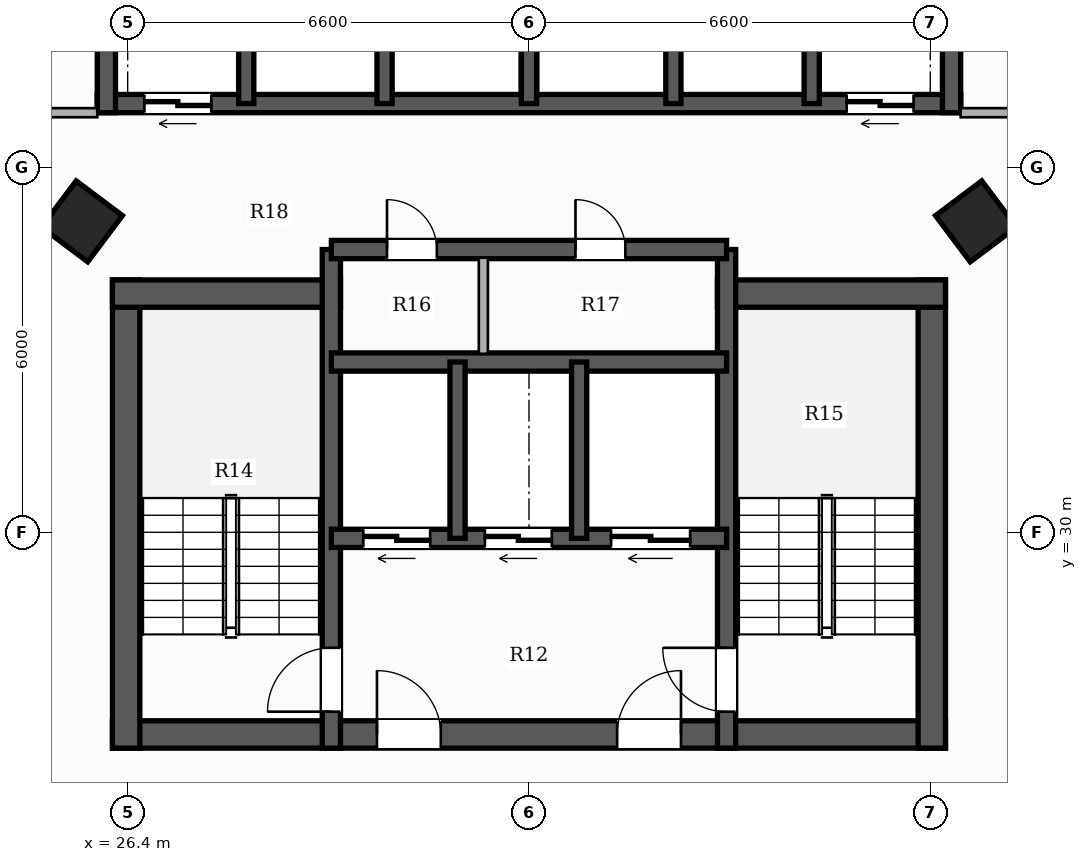
"""IFC4 building model, lengths in metres.
Left out: names, types, materials, properties, quantities, classifications, styles, units other than length and angle.
Written with IfcOpenShell. Run it as: python <this file> out.ifc"""

import sys

from ifc_helpers import new_model, si_unit, direction, frame, frame_2d, origin, origin_2d, place, context, subcontext, project, spatial, rectangle, hollow_rectangle, extrude, element, fill, save


model = new_model("IFC4")
c1 = context("Model", 3, precision=1e-05, world=origin(), true_north=direction((0.0, 1.0)))
c2 = subcontext(c1, "Body", "Model", "MODEL_VIEW")
j1 = project(units=[si_unit("LENGTHUNIT", "METRE"), si_unit("PLANEANGLEUNIT", "RADIAN")], contexts=[c1])
p1 = place(None, origin())
s1 = spatial("IfcSite", under=j1, at=p1, CompositionType="ELEMENT")
p2 = place(p1, origin())
s2 = spatial("IfcBuilding", under=s1, at=p2, CompositionType="ELEMENT")
p3 = place(p2, frame((0.0, 0.0, 87.35)))
s3 = spatial("IfcBuildingStorey", under=s2, at=p3, CompositionType="ELEMENT", Elevation=87.35)
p4 = place(p3, frame((26.15, 26.675, 0.0), z_axis=(0.0, 0.0, 1.0), x_axis=(1.0, 0.0, 0.0)))
e1 = element("IfcWall", 1, at=p4, inside=s3, PredefinedType="SHEAR", context=c2, shape_type="SweptSolid", body=[
    extrude(rectangle(XDim=13.7, YDim=0.45, at=frame_2d((6.85, 0.0))), origin(), (0.0, 0.0, 1.0), 3.3),
])
p5 = place(p4, frame((4.35, 0.0, 0.0)))
e2 = element("IfcOpeningElement", 2, at=p5, cuts=e1, PredefinedType="OPENING", context=c2, shape_type="SweptSolid", body=[
    extrude(rectangle(XDim=1.05, YDim=2.15, at=frame_2d((0.525, 1.075))), frame((0.0, 0.235, 0.0), z_axis=(0.0, -1.0, 0.0), x_axis=(1.0, 0.0, 0.0)), (0.0, 0.0, 1.0), 0.47),
])
p6 = place(p4, frame((8.3, 0.0, 0.0)))
e3 = element("IfcOpeningElement", 3, at=p6, cuts=e1, PredefinedType="OPENING", context=c2, shape_type="SweptSolid", body=[
    extrude(rectangle(XDim=1.05, YDim=2.15, at=frame_2d((0.525, 1.075))), frame((0.0, 0.235, 0.0), z_axis=(0.0, -1.0, 0.0), x_axis=(1.0, 0.0, 0.0)), (0.0, 0.0, 1.0), 0.47),
])
p7 = place(p3, frame((26.375, 26.45, 0.0), z_axis=(0.0, 0.0, 1.0), x_axis=(0.0, 1.0, 0.0)))
e4 = element("IfcWall", 4, at=p7, inside=s3, PredefinedType="SHEAR", context=c2, shape_type="SweptSolid", body=[
    extrude(rectangle(XDim=7.7, YDim=0.45, at=frame_2d((3.85, 0.0))), origin(), (0.0, 0.0, 1.0), 3.3),
])
p8 = place(p3, frame((26.15, 33.925, 0.0), z_axis=(0.0, 0.0, 1.0), x_axis=(1.0, 0.0, 0.0)))
e5 = element("IfcWall", 5, at=p8, inside=s3, PredefinedType="SHEAR", context=c2, shape_type="SweptSolid", body=[
    extrude(rectangle(XDim=3.75, YDim=0.45, at=frame_2d((1.875, 0.0))), origin(), (0.0, 0.0, 1.0), 3.3),
])
p9 = place(p3, frame((39.625, 26.45, 0.0), z_axis=(0.0, 0.0, 1.0), x_axis=(0.0, 1.0, 0.0)))
e6 = element("IfcWall", 6, at=p9, inside=s3, PredefinedType="SHEAR", context=c2, shape_type="SweptSolid", body=[
    extrude(rectangle(XDim=7.7, YDim=0.45, at=frame_2d((3.85, 0.0))), origin(), (0.0, 0.0, 1.0), 3.3),
])
p10 = place(p3, frame((36.1, 33.925, 0.0), z_axis=(0.0, 0.0, 1.0), x_axis=(1.0, 0.0, 0.0)))
e7 = element("IfcWall", 7, at=p10, inside=s3, PredefinedType="SHEAR", context=c2, shape_type="SweptSolid", body=[
    extrude(rectangle(XDim=3.75, YDim=0.45, at=frame_2d((1.875, 0.0))), origin(), (0.0, 0.0, 1.0), 3.3),
])
p11 = place(p3, frame((29.75, 26.45, 0.0), z_axis=(0.0, 0.0, 1.0), x_axis=(0.0, 1.0, 0.0)))
e8 = element("IfcWall", 8, at=p11, inside=s3, PredefinedType="SHEAR", context=c2, shape_type="SweptSolid", body=[
    extrude(rectangle(XDim=8.2, YDim=0.3, at=frame_2d((4.1, 0.0))), origin(), (0.0, 0.0, 1.0), 3.3),
])
p12 = place(p11, frame((0.6, 0.0, 0.0)))
e9 = element("IfcOpeningElement", 9, at=p12, cuts=e8, PredefinedType="OPENING", context=c2, shape_type="SweptSolid", body=[
    extrude(rectangle(XDim=1.05, YDim=2.15, at=frame_2d((0.525, 1.075))), frame((0.0, 0.16, 0.0), z_axis=(0.0, -1.0, 0.0), x_axis=(1.0, 0.0, 0.0)), (0.0, 0.0, 1.0), 0.32),
])
p13 = place(p3, frame((36.25, 26.45, 0.0), z_axis=(0.0, 0.0, 1.0), x_axis=(0.0, 1.0, 0.0)))
e10 = element("IfcWall", 10, at=p13, inside=s3, PredefinedType="SHEAR", context=c2, shape_type="SweptSolid", body=[
    extrude(rectangle(XDim=8.2, YDim=0.3, at=frame_2d((4.1, 0.0))), origin(), (0.0, 0.0, 1.0), 3.3),
])
p14 = place(p13, frame((0.6, 0.0, 0.0)))
e11 = element("IfcOpeningElement", 11, at=p14, cuts=e10, PredefinedType="OPENING", context=c2, shape_type="SweptSolid", body=[
    extrude(rectangle(XDim=1.05, YDim=2.15, at=frame_2d((0.525, 1.075))), frame((0.0, 0.16, 0.0), z_axis=(0.0, -1.0, 0.0), x_axis=(1.0, 0.0, 0.0)), (0.0, 0.0, 1.0), 0.32),
])
p15 = place(p3, frame((36.25, 29.9, 0.0), z_axis=(0.0, 0.0, 1.0), x_axis=(-1.0, 0.0, 0.0)))
e12 = element("IfcWall", 12, at=p15, inside=s3, PredefinedType="SHEAR", context=c2, shape_type="SweptSolid", body=[
    extrude(rectangle(XDim=6.5, YDim=0.3, at=frame_2d((3.25, 0.0))), origin(), (0.0, 0.0, 1.0), 3.3),
])
p16 = place(p15, frame((4.875, 0.0, 0.0)))
e13 = element("IfcOpeningElement", 13, at=p16, cuts=e12, PredefinedType="OPENING", context=c2, shape_type="SweptSolid", body=[
    extrude(rectangle(XDim=1.1, YDim=2.2, at=frame_2d((0.55, 1.1))), frame((0.0, 0.16, 0.0), z_axis=(0.0, -1.0, 0.0), x_axis=(1.0, 0.0, 0.0)), (0.0, 0.0, 1.0), 0.32),
])
p17 = place(p15, frame((2.875, 0.0, 0.0)))
e14 = element("IfcOpeningElement", 14, at=p17, cuts=e12, PredefinedType="OPENING", context=c2, shape_type="SweptSolid", body=[
    extrude(rectangle(XDim=1.1, YDim=2.2, at=frame_2d((0.55, 1.1))), frame((0.0, 0.16, 0.0), z_axis=(0.0, -1.0, 0.0), x_axis=(1.0, 0.0, 0.0)), (0.0, 0.0, 1.0), 0.32),
])
p18 = place(p15, frame((0.6, 0.0, 0.0)))
e15 = element("IfcOpeningElement", 15, at=p18, cuts=e12, PredefinedType="OPENING", context=c2, shape_type="SweptSolid", body=[
    extrude(rectangle(XDim=1.3, YDim=2.2, at=frame_2d((0.65, 1.1))), frame((0.0, 0.16, 0.0), z_axis=(0.0, -1.0, 0.0), x_axis=(1.0, 0.0, 0.0)), (0.0, 0.0, 1.0), 0.32),
])
p19 = place(p3, frame((29.75, 32.8, 0.0), z_axis=(0.0, 0.0, 1.0), x_axis=(1.0, 0.0, 0.0)))
e16 = element("IfcWall", 16, at=p19, inside=s3, PredefinedType="SHEAR", context=c2, shape_type="SweptSolid", body=[
    extrude(rectangle(XDim=6.5, YDim=0.3, at=frame_2d((3.25, 0.0))), origin(), (0.0, 0.0, 1.0), 3.3),
])
for number, where, z_axis, x_axis in (
    (17, (31.825, 29.9, 0.0), (0.0, 0.0, 1.0), (0.0, 1.0, 0.0)),
    (18, (33.825, 29.9, 0.0), (0.0, 0.0, 1.0), (0.0, 1.0, 0.0)),
):
    element("IfcWall", number, at=place(p3, frame(where, z_axis=z_axis, x_axis=x_axis)), inside=s3, PredefinedType="SHEAR", context=c2, shape_type="SweptSolid", body=[
        extrude(rectangle(XDim=2.9, YDim=0.25, at=frame_2d((1.45, 0.0))), origin(), (0.0, 0.0, 1.0), 3.3),
    ])
p20 = place(p3, frame((29.75, 34.65, 0.0), z_axis=(0.0, 0.0, 1.0), x_axis=(1.0, 0.0, 0.0)))
e19 = element("IfcWall", 19, at=p20, inside=s3, PredefinedType="SHEAR", context=c2, shape_type="SweptSolid", body=[
    extrude(rectangle(XDim=6.5, YDim=0.3, at=frame_2d((3.25, 0.0))), origin(), (0.0, 0.0, 1.0), 3.3),
])
p21 = place(p20, frame((0.915, 0.0, 0.0)))
e20 = element("IfcOpeningElement", 20, at=p21, cuts=e19, PredefinedType="OPENING", context=c2, shape_type="SweptSolid", body=[
    extrude(rectangle(XDim=0.82, YDim=2.1, at=frame_2d((0.41, 1.05))), frame((0.0, 0.16, 0.0), z_axis=(0.0, -1.0, 0.0), x_axis=(1.0, 0.0, 0.0)), (0.0, 0.0, 1.0), 0.32),
])
p22 = place(p20, frame((4.015, 0.0, 0.0)))
e21 = element("IfcOpeningElement", 21, at=p22, cuts=e19, PredefinedType="OPENING", context=c2, shape_type="SweptSolid", body=[
    extrude(rectangle(XDim=0.82, YDim=2.1, at=frame_2d((0.41, 1.05))), frame((0.0, 0.16, 0.0), z_axis=(0.0, -1.0, 0.0), x_axis=(1.0, 0.0, 0.0)), (0.0, 0.0, 1.0), 0.32),
])
p23 = place(p3, frame((40.1, 37.05, 0.0), z_axis=(0.0, 0.0, 1.0), x_axis=(-1.0, 0.0, 0.0)))
e22 = element("IfcWall", 22, at=p23, inside=s3, PredefinedType="SHEAR", context=c2, shape_type="SweptSolid", body=[
    extrude(rectangle(XDim=14.2, YDim=0.3, at=frame_2d((7.1, 0.0))), origin(), (0.0, 0.0, 1.0), 3.3),
])
p24 = place(p23, frame((12.325, 0.0, 0.0)))
e23 = element("IfcOpeningElement", 23, at=p24, cuts=e22, PredefinedType="OPENING", context=c2, shape_type="SweptSolid", body=[
    extrude(rectangle(XDim=1.1, YDim=2.2, at=frame_2d((0.55, 1.1))), frame((0.0, 0.16, 0.0), z_axis=(0.0, -1.0, 0.0), x_axis=(1.0, 0.0, 0.0)), (0.0, 0.0, 1.0), 0.32),
])
p25 = place(p23, frame((0.775, 0.0, 0.0)))
e24 = element("IfcOpeningElement", 24, at=p25, cuts=e22, PredefinedType="OPENING", context=c2, shape_type="SweptSolid", body=[
    extrude(rectangle(XDim=1.1, YDim=2.2, at=frame_2d((0.55, 1.1))), frame((0.0, 0.16, 0.0), z_axis=(0.0, -1.0, 0.0), x_axis=(1.0, 0.0, 0.0)), (0.0, 0.0, 1.0), 0.32),
])
for number, where, z_axis, x_axis in (
    (25, (26.05, 36.9, 0.0), (0.0, 0.0, 1.0), (0.0, 1.0, 0.0)),
    (26, (39.95, 36.9, 0.0), (0.0, 0.0, 1.0), (0.0, 1.0, 0.0)),
):
    element("IfcWall", number, at=place(p3, frame(where, z_axis=z_axis, x_axis=x_axis)), inside=s3, PredefinedType="SHEAR", context=c2, shape_type="SweptSolid", body=[
        extrude(rectangle(XDim=2.85, YDim=0.3, at=frame_2d((1.425, 0.0))), origin(), (0.0, 0.0, 1.0), 3.3),
    ])
for number, where, z_axis, x_axis in (
    (27, (28.35, 37.05, 0.0), (0.0, 0.0, 1.0), (0.0, 1.0, 0.0)),
    (28, (30.625, 37.05, 0.0), (0.0, 0.0, 1.0), (0.0, 1.0, 0.0)),
    (29, (33.0, 37.05, 0.0), (0.0, 0.0, 1.0), (0.0, 1.0, 0.0)),
    (30, (35.375, 37.05, 0.0), (0.0, 0.0, 1.0), (0.0, 1.0, 0.0)),
    (31, (37.65, 37.05, 0.0), (0.0, 0.0, 1.0), (0.0, 1.0, 0.0)),
):
    element("IfcWall", number, at=place(p3, frame(where, z_axis=z_axis, x_axis=x_axis)), inside=s3, PredefinedType="SHEAR", context=c2, shape_type="SweptSolid", body=[
        extrude(rectangle(XDim=2.55, YDim=0.25, at=frame_2d((1.275, 0.0))), origin(), (0.0, 0.0, 1.0), 3.3),
    ])
for number, where, z_axis, x_axis in (
    (32, (25.648, 35.113, 0.0), (0.0, 0.0, 1.0), (0.6, 0.8, 0.0)),
    (33, (40.352, 35.113, 0.0), (0.0, 0.0, 1.0), (-0.6, 0.8, 0.0)),
):
    element("IfcColumn", number, at=place(p3, frame(where, z_axis=z_axis, x_axis=x_axis)), inside=s3, PredefinedType="COLUMN", context=c2, shape_type="SweptSolid", body=[
        extrude(hollow_rectangle(XDim=0.95, YDim=0.95, WallThickness=0.032, at=origin_2d()), origin(), (0.0, 0.0, 1.0), 3.3),
    ])
p26 = place(p3, frame((32.25, 32.935, 0.0), z_axis=(0.0, 0.0, 1.0), x_axis=(0.0, 1.0, 0.0)))
e34 = element("IfcWall", 34, at=p26, inside=s3, PredefinedType="PARTITIONING", context=c2, shape_type="SweptSolid", body=[
    extrude(rectangle(XDim=1.58, YDim=0.15, at=frame_2d((0.79, 0.0))), origin(), (0.0, 0.0, 1.0), 3.06),
])
p27 = place(p3, frame((40.1, 36.9, 0.0), z_axis=(0.0, 0.0, 1.0), x_axis=(1.0, 0.0, 0.0)))
e35 = element("IfcWall", 35, at=p27, inside=s3, PredefinedType="PARTITIONING", context=c2, shape_type="SweptSolid", body=[
    extrude(rectangle(XDim=2.55, YDim=0.15, at=frame_2d((1.275, 0.0))), origin(), (0.0, 0.0, 1.0), 2.413),
])
p28 = place(p3, frame((23.41, 36.9, 0.0), z_axis=(0.0, 0.0, 1.0), x_axis=(1.0, 0.0, 0.0)))
e36 = element("IfcWall", 36, at=p28, inside=s3, PredefinedType="PARTITIONING", context=c2, shape_type="SweptSolid", body=[
    extrude(rectangle(XDim=2.49, YDim=0.15, at=frame_2d((1.245, 0.0))), origin(), (0.0, 0.0, 1.0), 2.413),
])
p29 = place(p12, origin())
e37 = element("IfcDoor", 37, at=p29, inside=s3, OperationType="SINGLE_SWING_LEFT", PredefinedType="DOOR", context=c2, shape_type="SweptSolid", body=[
    extrude(rectangle(XDim=1.05, YDim=2.15, at=frame_2d((0.525, 1.075))), frame((0.0, 0.025, 0.0), z_axis=(0.0, -1.0, 0.0), x_axis=(1.0, 0.0, 0.0)), (0.0, 0.0, 1.0), 0.05),
])
fill(e9, e37)
p30 = place(p14, origin())
e38 = element("IfcDoor", 38, at=p30, inside=s3, OperationType="SINGLE_SWING_RIGHT", PredefinedType="DOOR", context=c2, shape_type="SweptSolid", body=[
    extrude(rectangle(XDim=1.05, YDim=2.15, at=frame_2d((0.525, 1.075))), frame((0.0, 0.025, 0.0), z_axis=(0.0, -1.0, 0.0), x_axis=(1.0, 0.0, 0.0)), (0.0, 0.0, 1.0), 0.05),
])
fill(e11, e38)
p31 = place(p5, origin())
e39 = element("IfcDoor", 39, at=p31, inside=s3, OperationType="SINGLE_SWING_LEFT", PredefinedType="DOOR", context=c2, shape_type="SweptSolid", body=[
    extrude(rectangle(XDim=1.05, YDim=2.15, at=frame_2d((0.525, 1.075))), frame((0.0, 0.025, 0.0), z_axis=(0.0, -1.0, 0.0), x_axis=(1.0, 0.0, 0.0)), (0.0, 0.0, 1.0), 0.05),
])
fill(e2, e39)
p32 = place(p6, origin())
e40 = element("IfcDoor", 40, at=p32, inside=s3, OperationType="SINGLE_SWING_RIGHT", PredefinedType="DOOR", context=c2, shape_type="SweptSolid", body=[
    extrude(rectangle(XDim=1.05, YDim=2.15, at=frame_2d((0.525, 1.075))), frame((0.0, 0.025, 0.0), z_axis=(0.0, -1.0, 0.0), x_axis=(1.0, 0.0, 0.0)), (0.0, 0.0, 1.0), 0.05),
])
fill(e3, e40)
p33 = place(p16, origin())
e41 = element("IfcDoor", 41, at=p33, inside=s3, OperationType="DOUBLE_DOOR_SLIDING", PredefinedType="DOOR", context=c2, shape_type="SweptSolid", body=[
    extrude(rectangle(XDim=1.1, YDim=2.2, at=frame_2d((0.55, 1.1))), frame((0.0, 0.025, 0.0), z_axis=(0.0, -1.0, 0.0), x_axis=(1.0, 0.0, 0.0)), (0.0, 0.0, 1.0), 0.05),
])
fill(e13, e41)
p34 = place(p17, origin())
e42 = element("IfcDoor", 42, at=p34, inside=s3, OperationType="DOUBLE_DOOR_SLIDING", PredefinedType="DOOR", context=c2, shape_type="SweptSolid", body=[
    extrude(rectangle(XDim=1.1, YDim=2.2, at=frame_2d((0.55, 1.1))), frame((0.0, 0.025, 0.0), z_axis=(0.0, -1.0, 0.0), x_axis=(1.0, 0.0, 0.0)), (0.0, 0.0, 1.0), 0.05),
])
fill(e14, e42)
p35 = place(p18, origin())
e43 = element("IfcDoor", 43, at=p35, inside=s3, OperationType="DOUBLE_DOOR_SLIDING", PredefinedType="DOOR", context=c2, shape_type="SweptSolid", body=[
    extrude(rectangle(XDim=1.3, YDim=2.2, at=frame_2d((0.65, 1.1))), frame((0.0, 0.025, 0.0), z_axis=(0.0, -1.0, 0.0), x_axis=(1.0, 0.0, 0.0)), (0.0, 0.0, 1.0), 0.05),
])
fill(e15, e43)
p36 = place(p24, origin())
e44 = element("IfcDoor", 44, at=p36, inside=s3, OperationType="DOUBLE_DOOR_SLIDING", PredefinedType="DOOR", context=c2, shape_type="SweptSolid", body=[
    extrude(rectangle(XDim=1.1, YDim=2.2, at=frame_2d((0.55, 1.1))), frame((0.0, 0.025, 0.0), z_axis=(0.0, -1.0, 0.0), x_axis=(1.0, 0.0, 0.0)), (0.0, 0.0, 1.0), 0.05),
])
fill(e23, e44)
p37 = place(p25, origin())
e45 = element("IfcDoor", 45, at=p37, inside=s3, OperationType="DOUBLE_DOOR_SLIDING", PredefinedType="DOOR", context=c2, shape_type="SweptSolid", body=[
    extrude(rectangle(XDim=1.1, YDim=2.2, at=frame_2d((0.55, 1.1))), frame((0.0, 0.025, 0.0), z_axis=(0.0, -1.0, 0.0), x_axis=(1.0, 0.0, 0.0)), (0.0, 0.0, 1.0), 0.05),
])
fill(e24, e45)
p38 = place(p21, origin())
e46 = element("IfcDoor", 46, at=p38, inside=s3, OperationType="SINGLE_SWING_LEFT", PredefinedType="DOOR", context=c2, shape_type="SweptSolid", body=[
    extrude(rectangle(XDim=0.82, YDim=2.1, at=frame_2d((0.41, 1.05))), frame((0.0, 0.025, 0.0), z_axis=(0.0, -1.0, 0.0), x_axis=(1.0, 0.0, 0.0)), (0.0, 0.0, 1.0), 0.05),
])
fill(e20, e46)
p39 = place(p22, origin())
e47 = element("IfcDoor", 47, at=p39, inside=s3, OperationType="SINGLE_SWING_LEFT", PredefinedType="DOOR", context=c2, shape_type="SweptSolid", body=[
    extrude(rectangle(XDim=0.82, YDim=2.1, at=frame_2d((0.41, 1.05))), frame((0.0, 0.025, 0.0), z_axis=(0.0, -1.0, 0.0), x_axis=(1.0, 0.0, 0.0)), (0.0, 0.0, 1.0), 0.05),
])
fill(e21, e47)
save(model, sys.argv[1])
